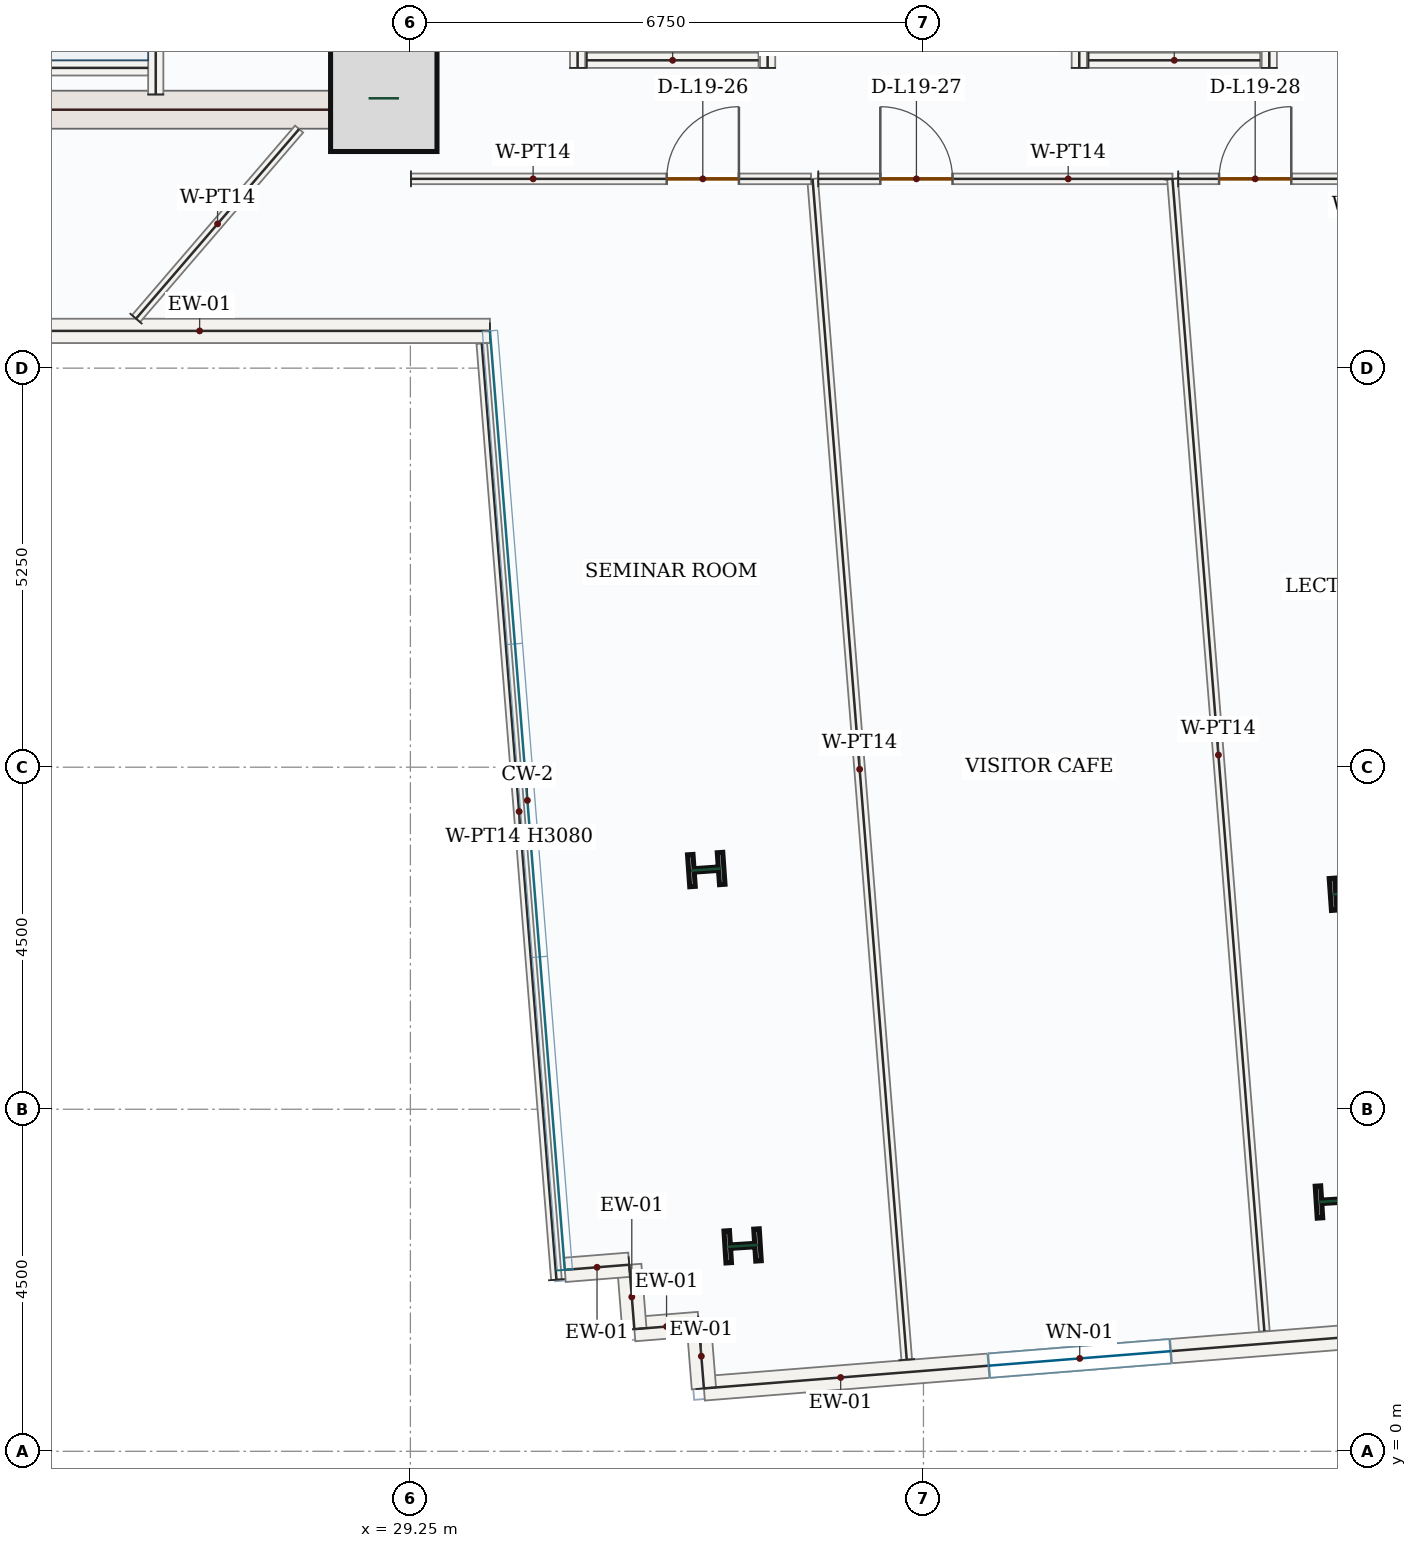
"""IFC4 building model, lengths in metres.
Left out: names, types, materials, properties, quantities, classifications, styles, units other than length and angle.
Written with IfcOpenShell. Run it as: python <this file> out.ifc"""

import sys

from ifc_helpers import new_model, si_unit, direction, frame, frame_2d, origin, origin_2d, place, context, subcontext, project, spatial, rectangle, i_section, extrude, source, transform, mapped, element, fill, save


model = new_model("IFC4")
c1 = context("Model", 3, precision=1e-05, world=origin(), true_north=direction((0.0, 1.0)))
c2 = subcontext(c1, "Body", "Model", "MODEL_VIEW")
j1 = project(units=[si_unit("LENGTHUNIT", "METRE"), si_unit("PLANEANGLEUNIT", "RADIAN")], contexts=[c1])
p1 = place(None, origin())
s1 = spatial("IfcSite", under=j1, at=p1, CompositionType="ELEMENT")
p2 = place(p1, origin())
s2 = spatial("IfcBuilding", under=s1, at=p2, CompositionType="ELEMENT")
p3 = place(p2, frame((0.0, 0.0, 87.9)))
s3 = spatial("IfcBuildingStorey", under=s2, at=p3, CompositionType="ELEMENT", Elevation=87.9)
p4 = place(p3, frame((29.0, 17.4, 0.0), z_axis=(0.0, 0.0, 1.0), x_axis=(0.0, 1.0, 0.0)))
e1 = element("IfcWall", 1, at=p4, inside=s3, PredefinedType="SHEAR", context=c2, shape_type="SweptSolid", body=[
    extrude(rectangle(XDim=8.55, YDim=0.5, at=frame_2d((4.275, 0.0))), origin(), (0.0, 0.0, 1.0), 3.95),
])
p5 = place(p4, frame((6.65, 0.0, 0.0)))
e2 = element("IfcOpeningElement", 2, at=p5, cuts=e1, PredefinedType="OPENING", context=c2, shape_type="SweptSolid", body=[
    extrude(rectangle(XDim=1.1, YDim=2.2, at=frame_2d((0.55, 1.1))), frame((0.0, 0.26, 0.0), z_axis=(0.0, -1.0, 0.0), x_axis=(1.0, 0.0, 0.0)), (0.0, 0.0, 1.0), 0.52),
])
p6 = place(p4, frame((2.15, 0.0, 0.0)))
e3 = element("IfcOpeningElement", 3, at=p6, cuts=e1, PredefinedType="OPENING", context=c2, shape_type="SweptSolid", body=[
    extrude(rectangle(XDim=0.88, YDim=2.1, at=frame_2d((0.44, 1.05))), frame((0.0, 0.26, 0.0), z_axis=(0.0, -1.0, 0.0), x_axis=(1.0, 0.0, 0.0)), (0.0, 0.0, 1.0), 0.52),
])
p7 = place(p4, frame((4.25, 0.0, 0.0)))
e4 = element("IfcOpeningElement", 4, at=p7, cuts=e1, PredefinedType="OPENING", context=c2, shape_type="SweptSolid", body=[
    extrude(rectangle(XDim=0.88, YDim=2.1, at=frame_2d((0.44, 1.05))), frame((0.0, 0.26, 0.0), z_axis=(0.0, -1.0, 0.0), x_axis=(1.0, 0.0, 0.0)), (0.0, 0.0, 1.0), 0.52),
])
m1 = source(origin(), c2, "Body", "SweptSolid", [
    extrude(rectangle(XDim=7.0, YDim=0.5, at=frame_2d((3.5, 0.0))), origin(), (0.0, 0.0, 1.0), 3.95),
])
p8 = place(p3, frame((21.75, 17.65, 0.0), z_axis=(0.0, 0.0, 1.0), x_axis=(1.0, 0.0, 0.0)))
e5 = element("IfcWall", 5, at=p8, inside=s3, PredefinedType="SHEAR", context=c2, shape_type="MappedRepresentation", body=[
    mapped(m1, transform((0.0, 0.0, 0.0), x_axis=(1.0, 0.0, 0.0), y_axis=(0.0, 1.0, 0.0), z_axis=(0.0, 0.0, 1.0), scale=1.0)),
])
m2 = source(origin(), c2, "Body", "SweptSolid", [
    extrude(rectangle(XDim=1.4, YDim=1.4, at=origin_2d()), origin(), (0.0, 0.0, 1.0), 4.2),
])
p9 = place(p3, frame((28.9, 17.8, 0.0), z_axis=(0.0, 0.0, 1.0), x_axis=(1.0, 0.0, 0.0)))
e6 = element("IfcColumn", 6, at=p9, inside=s3, PredefinedType="COLUMN", context=c2, shape_type="MappedRepresentation", body=[
    mapped(m2, transform((0.0, 0.0, 0.0), x_axis=(1.0, 0.0, 0.0), y_axis=(0.0, 1.0, 0.0), z_axis=(0.0, 0.0, 1.0), scale=1.0)),
])
m3 = source(origin(), c2, "Body", "SweptSolid", [
    extrude(i_section(OverallWidth=0.421, OverallDepth=0.465, WebThickness=0.045, FlangeThickness=0.073, FilletRadius=0.018, at=origin_2d()), origin(), (0.0, 0.0, 1.0), 4.2),
])
for number, where, z_axis, x_axis in (
    (7, (33.143, 7.654, 0.0), (0.0, 0.0, 1.0), (-0.07, 0.998, 0.0)),
    (8, (41.585, 7.342, 0.0), (0.0, 0.0, 1.0), (-0.07, 0.998, 0.0)),
    (9, (33.621, 2.703, 0.0), (0.0, 0.0, 1.0), (-0.063, 0.998, 0.0)),
    (10, (41.399, 3.292, 0.0), (0.0, 0.0, 1.0), (-0.063, 0.998, 0.0)),
):
    element("IfcColumn", number, at=place(p3, frame(where, z_axis=z_axis, x_axis=x_axis)), inside=s3, PredefinedType="COLUMN", context=c2, shape_type="MappedRepresentation", body=[
        mapped(m3, transform((0.0, 0.0, 0.0), x_axis=(1.0, 0.0, 0.0), y_axis=(0.0, 1.0, 0.0), z_axis=(0.0, 0.0, 1.0), scale=1.0)),
    ])
p10 = place(p3, frame((43.0, 1.616, 0.0), z_axis=(0.0, 0.0, 1.0), x_axis=(-0.996833485558, -0.079517306731, 0.0)))
e11 = element("IfcWall", 11, at=p10, inside=s3, PredefinedType="SOLIDWALL", context=c2, shape_type="SweptSolid", body=[
    extrude(rectangle(XDim=9.92, YDim=0.32, at=frame_2d((4.96, 0.0))), origin(), (0.0, 0.0, 1.0), 3.95),
])
p11 = place(p10, frame((3.76, 0.0, 0.85)))
e12 = element("IfcOpeningElement", 12, at=p11, cuts=e11, PredefinedType="OPENING", context=c2, shape_type="SweptSolid", body=[
    extrude(rectangle(XDim=2.4, YDim=1.8, at=frame_2d((1.2, 0.9))), frame((0.0, 0.17, 0.0), z_axis=(0.0, -1.0, 0.0), x_axis=(1.0, 0.0, 0.0)), (0.0, 0.0, 1.0), 0.34),
])
m4 = source(origin(), c2, "Body", "SweptSolid", [
    extrude(rectangle(XDim=0.85, YDim=0.32, at=frame_2d((0.425, 0.0))), origin(), (0.0, 0.0, 1.0), 3.95),
])
p12 = place(p3, frame((33.112, 0.827, 0.0), z_axis=(0.0, 0.0, 1.0), x_axis=(-0.079551174585, 0.996830783344, 0.0)))
e13 = element("IfcWall", 13, at=p12, inside=s3, PredefinedType="SOLIDWALL", context=c2, shape_type="MappedRepresentation", body=[
    mapped(m4, transform((0.0, 0.0, 0.0), x_axis=(1.0, 0.0, 0.0), y_axis=(0.0, 1.0, 0.0), z_axis=(0.0, 0.0, 1.0), scale=1.0)),
])
m5 = source(origin(), c2, "Body", "SweptSolid", [
    extrude(rectangle(XDim=0.85, YDim=0.32, at=frame_2d((0.425, 0.0))), origin(), (0.0, 0.0, 1.0), 3.95),
])
for number, where, z_axis, x_axis in (
    (14, (33.044, 1.675, 0.0), (0.0, 0.0, 1.0), (-0.997, -0.079, 0.0)),
    (15, (32.197, 1.607, 0.0), (0.0, 0.0, 1.0), (-0.08, 0.997, 0.0)),
):
    element("IfcWall", number, at=place(p3, frame(where, z_axis=z_axis, x_axis=x_axis)), inside=s3, PredefinedType="SOLIDWALL", context=c2, shape_type="MappedRepresentation", body=[
        mapped(m5, transform((0.0, 0.0, 0.0), x_axis=(1.0, 0.0, 0.0), y_axis=(0.0, 1.0, 0.0), z_axis=(0.0, 0.0, 1.0), scale=1.0)),
    ])
p13 = place(p3, frame((32.129, 2.455, 0.0), z_axis=(0.0, 0.0, 1.0), x_axis=(-0.996830783344, -0.079551174585, 0.0)))
e16 = element("IfcWall", 16, at=p13, inside=s3, PredefinedType="SOLIDWALL", context=c2, shape_type="MappedRepresentation", body=[
    mapped(m4, transform((0.0, 0.0, 0.0), x_axis=(1.0, 0.0, 0.0), y_axis=(0.0, 1.0, 0.0), z_axis=(0.0, 0.0, 1.0), scale=1.0)),
])
m6 = source(origin(), c2, "Body", "SweptSolid", [
    extrude(rectangle(XDim=7.639, YDim=0.32, at=frame_2d((3.819, 0.0))), origin(), (0.0, 0.0, 1.0), 3.95),
])
p14 = place(p3, frame((30.297, 14.74, 0.0), z_axis=(0.0, 0.0, 1.0), x_axis=(-1.0, 0.0, 0.0)))
e17 = element("IfcWall", 17, at=p14, inside=s3, PredefinedType="SOLIDWALL", context=c2, shape_type="MappedRepresentation", body=[
    mapped(m6, transform((0.0, 0.0, 0.0), x_axis=(1.0, 0.0, 0.0), y_axis=(0.0, 1.0, 0.0), z_axis=(0.0, 0.0, 1.0), scale=1.0)),
])
p15 = place(p3, frame((25.9, 17.85, 0.0), z_axis=(0.0, 0.0, 1.0), x_axis=(0.0, 1.0, 0.0)))
e18 = element("IfcWall", 18, at=p15, inside=s3, PredefinedType="SOLIDWALL", context=c2, shape_type="SweptSolid", body=[
    extrude(rectangle(XDim=8.0, YDim=0.2, at=frame_2d((4.0, 0.0))), origin(), (0.0, 0.0, 1.0), 3.95),
])
p16 = place(p15, frame((6.3, 0.0, 0.0)))
e19 = element("IfcOpeningElement", 19, at=p16, cuts=e18, PredefinedType="OPENING", context=c2, shape_type="SweptSolid", body=[
    extrude(rectangle(XDim=1.05, YDim=2.15, at=frame_2d((0.525, 1.075))), frame((0.0, 0.11, 0.0), z_axis=(0.0, -1.0, 0.0), x_axis=(1.0, 0.0, 0.0)), (0.0, 0.0, 1.0), 0.22),
])
m7 = source(origin(), c2, "Body", "SweptSolid", [
    extrude(rectangle(XDim=3.25, YDim=0.2, at=frame_2d((1.625, 0.0))), origin(), (0.0, 0.0, 1.0), 3.95),
])
p17 = place(p3, frame((22.55, 18.2, 0.0), z_axis=(0.0, 0.0, 1.0), x_axis=(1.0, 0.0, 0.0)))
e20 = element("IfcWall", 20, at=p17, inside=s3, PredefinedType="SOLIDWALL", context=c2, shape_type="MappedRepresentation", body=[
    mapped(m7, transform((0.0, 0.0, 0.0), x_axis=(1.0, 0.0, 0.0), y_axis=(0.0, 1.0, 0.0), z_axis=(0.0, 0.0, 1.0), scale=1.0)),
])
m8 = source(origin(), c2, "Body", "SweptSolid", [
    extrude(rectangle(XDim=2.35, YDim=0.2, at=frame_2d((1.175, 0.0))), origin(), (0.0, 0.0, 1.0), 3.95),
])
for number, where, z_axis, x_axis in (
    (21, (31.45, 18.2, 0.0), (0.0, 0.0, 1.0), (0.0, 1.0, 0.0)),
    (22, (33.95, 18.2, 0.0), (0.0, 0.0, 1.0), (0.0, 1.0, 0.0)),
):
    element("IfcWall", number, at=place(p3, frame(where, z_axis=z_axis, x_axis=x_axis)), inside=s3, PredefinedType="SOLIDWALL", context=c2, shape_type="MappedRepresentation", body=[
        mapped(m8, transform((0.0, 0.0, 0.0), x_axis=(1.0, 0.0, 0.0), y_axis=(0.0, 1.0, 0.0), z_axis=(0.0, 0.0, 1.0), scale=1.0)),
    ])
m9 = source(origin(), c2, "Body", "SweptSolid", [
    extrude(rectangle(XDim=2.26, YDim=0.2, at=frame_2d((1.13, 0.0))), origin(), (0.0, 0.0, 1.0), 3.95),
])
p18 = place(p3, frame((31.57, 18.3, 0.0), z_axis=(0.0, 0.0, 1.0), x_axis=(1.0, 0.0, 0.0)))
e23 = element("IfcWall", 23, at=p18, inside=s3, PredefinedType="SOLIDWALL", context=c2, shape_type="MappedRepresentation", body=[
    mapped(m9, transform((0.0, 0.0, 0.0), x_axis=(1.0, 0.0, 0.0), y_axis=(0.0, 1.0, 0.0), z_axis=(0.0, 0.0, 1.0), scale=1.0)),
])
for number, where, z_axis, x_axis in (
    (24, (38.05, 18.2, 0.0), (0.0, 0.0, 1.0), (0.0, 1.0, 0.0)),
    (25, (40.55, 18.2, 0.0), (0.0, 0.0, 1.0), (0.0, 1.0, 0.0)),
):
    element("IfcWall", number, at=place(p3, frame(where, z_axis=z_axis, x_axis=x_axis)), inside=s3, PredefinedType="SOLIDWALL", context=c2, shape_type="MappedRepresentation", body=[
        mapped(m8, transform((0.0, 0.0, 0.0), x_axis=(1.0, 0.0, 0.0), y_axis=(0.0, 1.0, 0.0), z_axis=(0.0, 0.0, 1.0), scale=1.0)),
    ])
p19 = place(p3, frame((38.17, 18.3, 0.0), z_axis=(0.0, 0.0, 1.0), x_axis=(1.0, 0.0, 0.0)))
e26 = element("IfcWall", 26, at=p19, inside=s3, PredefinedType="SOLIDWALL", context=c2, shape_type="MappedRepresentation", body=[
    mapped(m9, transform((0.0, 0.0, 0.0), x_axis=(1.0, 0.0, 0.0), y_axis=(0.0, 1.0, 0.0), z_axis=(0.0, 0.0, 1.0), scale=1.0)),
])
m10 = source(origin(), c2, "Body", "SweptSolid", [
    extrude(rectangle(XDim=15.583, YDim=0.14, at=frame_2d((7.792, 0.0))), origin(), (0.0, 0.0, 1.0), 3.95),
])
p20 = place(p3, frame((35.78, 1.206, 0.0), z_axis=(0.0, 0.0, 1.0), x_axis=(-0.079507979427, 0.996834229552, 0.0)))
e27 = element("IfcWall", 27, at=p20, inside=s3, PredefinedType="PARTITIONING", context=c2, shape_type="MappedRepresentation", body=[
    mapped(m10, transform((0.0, 0.0, 0.0), x_axis=(1.0, 0.0, 0.0), y_axis=(0.0, 1.0, 0.0), z_axis=(0.0, 0.0, 1.0), scale=1.0)),
])
p21 = place(p3, frame((34.616, 16.74, 0.0), z_axis=(0.0, 0.0, 1.0), x_axis=(1.0, 0.0, 0.0)))
e28 = element("IfcWall", 28, at=p21, inside=s3, PredefinedType="PARTITIONING", context=c2, shape_type="SweptSolid", body=[
    extrude(rectangle(XDim=4.66, YDim=0.14, at=frame_2d((2.33, 0.0))), origin(), (0.0, 0.0, 1.0), 3.95),
])
p22 = place(p21, frame((0.816, 0.0, 0.0)))
e29 = element("IfcOpeningElement", 29, at=p22, cuts=e28, PredefinedType="OPENING", context=c2, shape_type="SweptSolid", body=[
    extrude(rectangle(XDim=0.95, YDim=2.15, at=frame_2d((0.475, 1.075))), frame((0.0, 0.08, 0.0), z_axis=(0.0, -1.0, 0.0), x_axis=(1.0, 0.0, 0.0)), (0.0, 0.0, 1.0), 0.16),
])
m11 = source(origin(), c2, "Body", "SweptSolid", [
    extrude(rectangle(XDim=15.207, YDim=0.14, at=frame_2d((7.604, 0.0))), origin(), (0.0, 0.0, 1.0), 3.95),
])
p23 = place(p3, frame((39.276, 16.74, 0.0), z_axis=(0.0, 0.0, 1.0), x_axis=(0.07950146843, -0.996834748851, 0.0)))
e30 = element("IfcWall", 30, at=p23, inside=s3, PredefinedType="PARTITIONING", context=c2, shape_type="MappedRepresentation", body=[
    mapped(m11, transform((0.0, 0.0, 0.0), x_axis=(1.0, 0.0, 0.0), y_axis=(0.0, 1.0, 0.0), z_axis=(0.0, 0.0, 1.0), scale=1.0)),
])
p24 = place(p3, frame((39.351, 16.74, 0.0), z_axis=(0.0, 0.0, 1.0), x_axis=(0.999999935369, 0.000359531148, 0.0)))
e31 = element("IfcWall", 31, at=p24, inside=s3, PredefinedType="PARTITIONING", context=c2, shape_type="SweptSolid", body=[
    extrude(rectangle(XDim=3.395, YDim=0.14, at=frame_2d((1.698, 0.0))), origin(), (0.0, 0.0, 1.0), 3.95),
])
p25 = place(p24, frame((0.538, 0.0, 0.0)))
e32 = element("IfcOpeningElement", 32, at=p25, cuts=e31, PredefinedType="OPENING", context=c2, shape_type="SweptSolid", body=[
    extrude(rectangle(XDim=0.95, YDim=2.15, at=frame_2d((0.475, 1.075))), frame((0.0, 0.08, 0.0), z_axis=(0.0, -1.0, 0.0), x_axis=(1.0, 0.0, 0.0)), (0.0, 0.0, 1.0), 0.16),
])
p26 = place(p3, frame((29.258, 16.74, 0.0), z_axis=(0.0, 0.0, 1.0), x_axis=(0.999999998924, -4.6384341e-05, 0.0)))
e33 = element("IfcWall", 33, at=p26, inside=s3, PredefinedType="PARTITIONING", context=c2, shape_type="SweptSolid", body=[
    extrude(rectangle(XDim=5.263, YDim=0.14, at=frame_2d((2.632, 0.0))), origin(), (0.0, 0.0, 1.0), 3.95),
])
p27 = place(p26, frame((3.365, 0.0, 0.0)))
e34 = element("IfcOpeningElement", 34, at=p27, cuts=e33, PredefinedType="OPENING", context=c2, shape_type="SweptSolid", body=[
    extrude(rectangle(XDim=0.95, YDim=2.15, at=frame_2d((0.475, 1.075))), frame((0.0, 0.08, 0.0), z_axis=(0.0, -1.0, 0.0), x_axis=(1.0, 0.0, 0.0)), (0.0, 0.0, 1.0), 0.16),
])
m12 = source(origin(), c2, "Body", "SweptSolid", [
    extrude(rectangle(XDim=12.356, YDim=0.14, at=frame_2d((6.178, 0.0))), origin(), (0.0, 0.0, 1.0), 3.08),
])
p28 = place(p3, frame((31.172, 2.258, 0.0), z_axis=(0.0, 0.0, 1.0), x_axis=(-0.079527689156, 0.996832657299, 0.0)))
e35 = element("IfcWall", 35, at=p28, inside=s3, PredefinedType="PARTITIONING", context=c2, shape_type="MappedRepresentation", body=[
    mapped(m12, transform((0.0, 0.0, 0.0), x_axis=(1.0, 0.0, 0.0), y_axis=(0.0, 1.0, 0.0), z_axis=(0.0, 0.0, 1.0), scale=1.0)),
])
m13 = source(origin(), c2, "Body", "SweptSolid", [
    extrude(rectangle(XDim=3.29, YDim=0.14, at=frame_2d((1.645, 0.0))), origin(), (0.0, 0.0, 1.0), 3.95),
])
p29 = place(p3, frame((25.64, 14.901, 0.0), z_axis=(0.0, 0.0, 1.0), x_axis=(0.652214149627, 0.758034763732, 0.0)))
e36 = element("IfcWall", 36, at=p29, inside=s3, PredefinedType="PARTITIONING", context=c2, shape_type="MappedRepresentation", body=[
    mapped(m13, transform((0.0, 0.0, 0.0), x_axis=(1.0, 0.0, 0.0), y_axis=(0.0, 1.0, 0.0), z_axis=(0.0, 0.0, 1.0), scale=1.0)),
])
m14 = source(origin(), c2, "Body", "SweptSolid", [
    extrude(rectangle(XDim=2.4, YDim=1.8, at=frame_2d((1.2, 0.9))), frame((0.0, 0.03, 0.0), z_axis=(0.0, -1.0, 0.0), x_axis=(1.0, 0.0, 0.0)), (0.0, 0.0, 1.0), 0.06),
])
p30 = place(p11, origin())
e37 = element("IfcWindow", 37, at=p30, inside=s3, PartitioningType="DOUBLE_PANEL_VERTICAL", PredefinedType="WINDOW", context=c2, shape_type="MappedRepresentation", body=[
    mapped(m14, transform((0.0, 0.0, 0.0), x_axis=(1.0, 0.0, 0.0), y_axis=(0.0, 1.0, 0.0), z_axis=(0.0, 0.0, 1.0), scale=1.0)),
])
fill(e12, e37)
m15 = source(origin(), c2, "Body", "SweptSolid", [
    extrude(rectangle(XDim=0.95, YDim=2.15, at=frame_2d((0.475, 1.075))), frame((0.0, 0.025, 0.0), z_axis=(0.0, -1.0, 0.0), x_axis=(1.0, 0.0, 0.0)), (0.0, 0.0, 1.0), 0.05),
])
p31 = place(p27, origin())
e38 = element("IfcDoor", 38, at=p31, inside=s3, OperationType="SINGLE_SWING_RIGHT", PredefinedType="DOOR", context=c2, shape_type="MappedRepresentation", body=[
    mapped(m15, transform((0.0, 0.0, 0.0), x_axis=(1.0, 0.0, 0.0), y_axis=(0.0, 1.0, 0.0), z_axis=(0.0, 0.0, 1.0), scale=1.0)),
])
fill(e34, e38)
p32 = place(p22, origin())
e39 = element("IfcDoor", 39, at=p32, inside=s3, OperationType="SINGLE_SWING_LEFT", PredefinedType="DOOR", context=c2, shape_type="MappedRepresentation", body=[
    mapped(m15, transform((0.0, 0.0, 0.0), x_axis=(1.0, 0.0, 0.0), y_axis=(0.0, 1.0, 0.0), z_axis=(0.0, 0.0, 1.0), scale=1.0)),
])
fill(e29, e39)
p33 = place(p25, origin())
e40 = element("IfcDoor", 40, at=p33, inside=s3, OperationType="SINGLE_SWING_RIGHT", PredefinedType="DOOR", context=c2, shape_type="MappedRepresentation", body=[
    mapped(m15, transform((0.0, 0.0, 0.0), x_axis=(1.0, 0.0, 0.0), y_axis=(0.0, 1.0, 0.0), z_axis=(0.0, 0.0, 1.0), scale=1.0)),
])
fill(e32, e40)
save(model, sys.argv[1])
